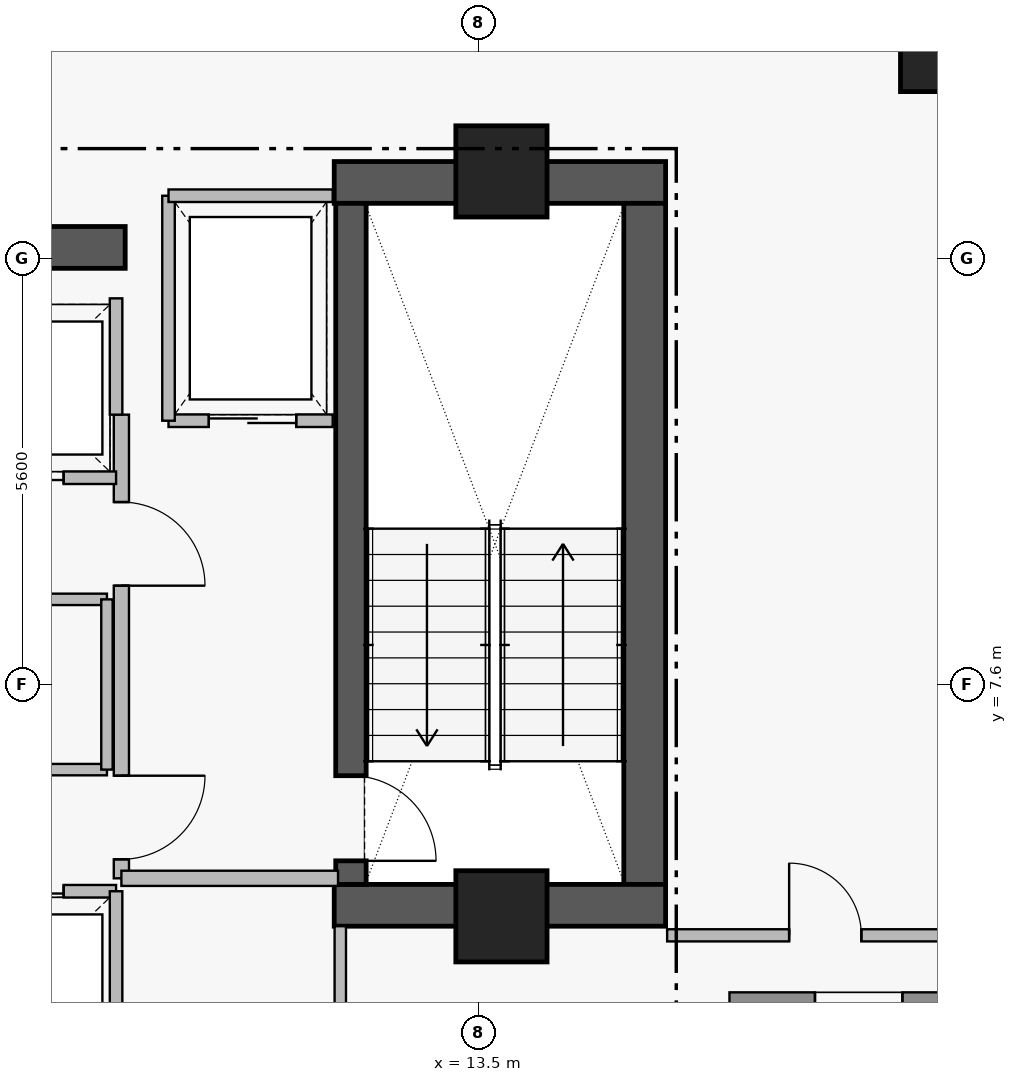
"""IFC4 building model, lengths in metres.
Left out: names, types, materials, properties, quantities, classifications, styles, units other than length and angle.
Written with IfcOpenShell. Run it as: python <this file> out.ifc"""

import sys

from ifc_helpers import new_model, si_unit, direction, frame, frame_2d, origin, origin_2d, place, context, subcontext, project, spatial, rectangle, extrude, element, fill, save


model = new_model("IFC4")
c1 = context("Model", 3, precision=1e-05, world=origin(), true_north=direction((0.0, 1.0)))
c2 = subcontext(c1, "Body", "Model", "MODEL_VIEW")
j1 = project(units=[si_unit("LENGTHUNIT", "METRE"), si_unit("PLANEANGLEUNIT", "RADIAN")], contexts=[c1])
p1 = place(None, origin())
s1 = spatial("IfcSite", under=j1, at=p1, CompositionType="ELEMENT")
p2 = place(p1, origin())
s2 = spatial("IfcBuilding", under=s1, at=p2, CompositionType="ELEMENT")
p3 = place(p2, frame((0.0, 0.0, 261.85)))
s3 = spatial("IfcBuildingStorey", under=s2, at=p3, CompositionType="ELEMENT", Elevation=261.85)
p4 = place(p3, frame((11.6, 14.205, 0.0), z_axis=(0.0, 0.0, 1.0), x_axis=(1.0, 0.0, 0.0)))
e1 = element("IfcWall", 1, at=p4, inside=s3, PredefinedType="SHEAR", context=c2, shape_type="SweptSolid", body=[
    extrude(rectangle(XDim=4.36, YDim=0.55, at=frame_2d((2.18, 0.0))), origin(), (0.0, 0.0, 1.0), 3.51),
])
p5 = place(p3, frame((15.685, 4.97, 0.0), z_axis=(0.0, 0.0, 1.0), x_axis=(0.0, 1.0, 0.0)))
e2 = element("IfcWall", 2, at=p5, inside=s3, PredefinedType="SHEAR", context=c2, shape_type="SweptSolid", body=[
    extrude(rectangle(XDim=8.96, YDim=0.55, at=frame_2d((4.48, 0.0))), origin(), (0.0, 0.0, 1.0), 3.51),
])
p6 = place(p3, frame((11.6, 4.695, 0.0), z_axis=(0.0, 0.0, 1.0), x_axis=(1.0, 0.0, 0.0)))
e3 = element("IfcWall", 3, at=p6, inside=s3, PredefinedType="SHEAR", context=c2, shape_type="SweptSolid", body=[
    extrude(rectangle(XDim=4.36, YDim=0.55, at=frame_2d((2.18, 0.0))), origin(), (0.0, 0.0, 1.0), 3.51),
])
p7 = place(p3, frame((1.25, 13.35, 0.0), z_axis=(0.0, 0.0, 1.0), x_axis=(1.0, 0.0, 0.0)))
e4 = element("IfcWall", 4, at=p7, inside=s3, PredefinedType="SHEAR", context=c2, shape_type="SweptSolid", body=[
    extrude(rectangle(XDim=7.6, YDim=0.55, at=frame_2d((3.8, 0.0))), origin(), (0.0, 0.0, 1.0), 3.48),
])
p8 = place(p3, frame((11.82, 13.93, 0.0), z_axis=(0.0, 0.0, 1.0), x_axis=(0.0, -1.0, 0.0)))
e5 = element("IfcWall", 5, at=p8, inside=s3, PredefinedType="SHEAR", context=c2, shape_type="SweptSolid", body=[
    extrude(rectangle(XDim=8.96, YDim=0.4, at=frame_2d((4.48, 0.0))), origin(), (0.0, 0.0, 1.0), 3.51),
])
p9 = place(p8, frame((7.53, 0.0, 0.0)))
e6 = element("IfcOpeningElement", 6, at=p9, cuts=e5, PredefinedType="OPENING", context=c2, shape_type="SweptSolid", body=[
    extrude(rectangle(XDim=1.12, YDim=2.22, at=frame_2d((0.56, 1.11))), frame((0.0, 0.21, 0.0), z_axis=(0.0, -1.0, 0.0), x_axis=(1.0, 0.0, 0.0)), (0.0, 0.0, 1.0), 0.42),
])
for number, where, z_axis, x_axis in (
    (7, (13.8, 14.35, 0.0), (0.0, 0.0, 1.0), (1.0, 0.0, 0.0)),
    (8, (13.8, 4.55, 0.0), (0.0, 0.0, 1.0), (1.0, 0.0, 0.0)),
):
    element("IfcColumn", number, at=place(p3, frame(where, z_axis=z_axis, x_axis=x_axis)), inside=s3, PredefinedType="COLUMN", context=c2, shape_type="SweptSolid", body=[
        extrude(rectangle(XDim=1.2, YDim=1.2, at=origin_2d()), origin(), (0.0, 0.0, 1.0), 3.7),
    ])
p10 = place(p3, frame((19.55, 15.9, 0.0), z_axis=(0.0, 0.0, 1.0), x_axis=(1.0, 0.0, 0.0)))
e9 = element("IfcColumn", 9, at=p10, inside=s3, PredefinedType="COLUMN", context=c2, shape_type="SweptSolid", body=[
    extrude(rectangle(XDim=1.0, YDim=1.0, at=origin_2d()), origin(), (0.0, 0.0, 1.0), 3.7),
])
p11 = place(p3, frame((20.2, 3.4, 0.0), z_axis=(0.0, 0.0, 1.0), x_axis=(-1.0, 0.0, 0.0)))
e10 = element("IfcWall", 10, at=p11, inside=s3, PredefinedType="STANDARD", context=c2, shape_type="SweptSolid", body=[
    extrude(rectangle(XDim=3.4, YDim=0.3, at=frame_2d((1.7, 0.0))), origin(), (0.0, 0.0, 1.0), 3.48),
])
p12 = place(p11, frame((1.125, 0.0, 1.25)))
e11 = element("IfcOpeningElement", 11, at=p12, cuts=e10, PredefinedType="OPENING", context=c2, shape_type="SweptSolid", body=[
    extrude(rectangle(XDim=1.15, YDim=1.55, at=frame_2d((0.575, 0.775))), frame((0.0, 0.16, 0.0), z_axis=(0.0, -1.0, 0.0), x_axis=(1.0, 0.0, 0.0)), (0.0, 0.0, 1.0), 0.32),
])
p13 = place(p3, frame((8.8, 11.15, 0.0), z_axis=(0.0, 0.0, 1.0), x_axis=(0.0, -1.0, 0.0)))
e12 = element("IfcWall", 12, at=p13, inside=s3, PredefinedType="PARTITIONING", context=c2, shape_type="SweptSolid", body=[
    extrude(rectangle(XDim=6.1, YDim=0.2, at=frame_2d((3.05, 0.0))), origin(), (0.0, 0.0, 1.0), 3.48),
])
p14 = place(p13, frame((1.15, 0.0, 0.0)))
e13 = element("IfcOpeningElement", 13, at=p14, cuts=e12, PredefinedType="OPENING", context=c2, shape_type="SweptSolid", body=[
    extrude(rectangle(XDim=1.1, YDim=2.2, at=frame_2d((0.55, 1.1))), frame((0.0, 0.11, 0.0), z_axis=(0.0, -1.0, 0.0), x_axis=(1.0, 0.0, 0.0)), (0.0, 0.0, 1.0), 0.22),
])
p15 = place(p13, frame((4.75, 0.0, 0.0)))
e14 = element("IfcOpeningElement", 14, at=p15, cuts=e12, PredefinedType="OPENING", context=c2, shape_type="SweptSolid", body=[
    extrude(rectangle(XDim=1.1, YDim=2.2, at=frame_2d((0.55, 1.1))), frame((0.0, 0.11, 0.0), z_axis=(0.0, -1.0, 0.0), x_axis=(1.0, 0.0, 0.0)), (0.0, 0.0, 1.0), 0.22),
])
p16 = place(p3, frame((9.42, 11.07, 0.0), z_axis=(0.0, 0.0, 1.0), x_axis=(1.0, 0.0, 0.0)))
e15 = element("IfcWall", 15, at=p16, inside=s3, PredefinedType="PARTITIONING", context=c2, shape_type="SweptSolid", body=[
    extrude(rectangle(XDim=2.16, YDim=0.165, at=frame_2d((1.08, 0.0))), origin(), (0.0, 0.0, 1.0), 3.48),
])
p17 = place(p16, frame((0.53, 0.0, 0.0)))
e16 = element("IfcOpeningElement", 16, at=p17, cuts=e15, PredefinedType="OPENING", context=c2, shape_type="SweptSolid", body=[
    extrude(rectangle(XDim=1.15, YDim=2.25, at=frame_2d((0.575, 1.125))), frame((0.0, 0.093, 0.0), z_axis=(0.0, -1.0, 0.0), x_axis=(1.0, 0.0, 0.0)), (0.0, 0.0, 1.0), 0.185),
])
p18 = place(p3, frame((6.25, 4.88, 0.0), z_axis=(0.0, 0.0, 1.0), x_axis=(1.0, 0.0, 0.0)))
e17 = element("IfcWall", 17, at=p18, inside=s3, PredefinedType="PARTITIONING", context=c2, shape_type="SweptSolid", body=[
    extrude(rectangle(XDim=2.48, YDim=0.165, at=frame_2d((1.24, 0.0))), origin(), (0.0, 0.0, 1.0), 3.48),
])
p19 = place(p18, frame((0.69, 0.0, 0.0)))
e18 = element("IfcOpeningElement", 18, at=p19, cuts=e17, PredefinedType="OPENING", context=c2, shape_type="SweptSolid", body=[
    extrude(rectangle(XDim=1.1, YDim=2.25, at=frame_2d((0.55, 1.125))), frame((0.0, 0.093, 0.0), z_axis=(0.0, -1.0, 0.0), x_axis=(1.0, 0.0, 0.0)), (0.0, 0.0, 1.0), 0.185),
])
p20 = place(p3, frame((6.25, 10.32, 0.0), z_axis=(0.0, 0.0, 1.0), x_axis=(1.0, 0.0, 0.0)))
e19 = element("IfcWall", 19, at=p20, inside=s3, PredefinedType="PARTITIONING", context=c2, shape_type="SweptSolid", body=[
    extrude(rectangle(XDim=2.48, YDim=0.165, at=frame_2d((1.24, 0.0))), origin(), (0.0, 0.0, 1.0), 3.48),
])
p21 = place(p20, frame((0.69, 0.0, 0.0)))
e20 = element("IfcOpeningElement", 20, at=p21, cuts=e19, PredefinedType="OPENING", context=c2, shape_type="SweptSolid", body=[
    extrude(rectangle(XDim=1.1, YDim=2.25, at=frame_2d((0.55, 1.125))), frame((0.0, 0.093, 0.0), z_axis=(0.0, -1.0, 0.0), x_axis=(1.0, 0.0, 0.0)), (0.0, 0.0, 1.0), 0.185),
])
p22 = place(p3, frame((4.37, 6.48, 0.0), z_axis=(0.0, 0.0, 1.0), x_axis=(1.0, 0.0, 0.0)))
e21 = element("IfcWall", 21, at=p22, inside=s3, PredefinedType="PARTITIONING", context=c2, shape_type="SweptSolid", body=[
    extrude(rectangle(XDim=4.24, YDim=0.15, at=frame_2d((2.12, 0.0))), origin(), (0.0, 0.0, 1.0), 3.48),
])
p23 = place(p22, frame((1.67, 0.0, 0.0)))
e22 = element("IfcOpeningElement", 22, at=p23, cuts=e21, PredefinedType="OPENING", context=c2, shape_type="SweptSolid", body=[
    extrude(rectangle(XDim=0.9, YDim=2.15, at=frame_2d((0.45, 1.075))), frame((0.0, 0.085, 0.0), z_axis=(0.0, -1.0, 0.0), x_axis=(1.0, 0.0, 0.0)), (0.0, 0.0, 1.0), 0.17),
])
p24 = place(p3, frame((15.98, 4.3, 0.0), z_axis=(0.0, 0.0, 1.0), x_axis=(1.0, 0.0, 0.0)))
e23 = element("IfcWall", 23, at=p24, inside=s3, PredefinedType="PARTITIONING", context=c2, shape_type="SweptSolid", body=[
    extrude(rectangle(XDim=4.16, YDim=0.16, at=frame_2d((2.08, 0.0))), origin(), (0.0, 0.0, 1.0), 3.48),
])
p25 = place(p24, frame((1.605, 0.0, 0.0)))
e24 = element("IfcOpeningElement", 24, at=p25, cuts=e23, PredefinedType="OPENING", context=c2, shape_type="SweptSolid", body=[
    extrude(rectangle(XDim=0.95, YDim=2.15, at=frame_2d((0.475, 1.075))), frame((0.0, 0.09, 0.0), z_axis=(0.0, -1.0, 0.0), x_axis=(1.0, 0.0, 0.0)), (0.0, 0.0, 1.0), 0.18),
])
p26 = place(p3, frame((8.8, 5.05, 0.0), z_axis=(0.0, 0.0, 1.0), x_axis=(1.0, 0.0, 0.0)))
e25 = element("IfcWall", 25, at=p26, inside=s3, PredefinedType="PARTITIONING", context=c2, shape_type="SweptSolid", body=[
    extrude(rectangle(XDim=2.85, YDim=0.2, at=frame_2d((1.425, 0.0))), origin(), (0.0, 0.0, 1.0), 3.48),
])
p27 = place(p3, frame((9.42, 11.07, 0.0), z_axis=(0.0, 0.0, 1.0), x_axis=(0.0, 1.0, 0.0)))
e26 = element("IfcWall", 26, at=p27, inside=s3, PredefinedType="PARTITIONING", context=c2, shape_type="SweptSolid", body=[
    extrude(rectangle(XDim=2.96, YDim=0.165, at=frame_2d((1.48, 0.0))), origin(), (0.0, 0.0, 1.0), 3.48),
])
p28 = place(p3, frame((9.42, 14.03, 0.0), z_axis=(0.0, 0.0, 1.0), x_axis=(1.0, 0.0, 0.0)))
e27 = element("IfcWall", 27, at=p28, inside=s3, PredefinedType="PARTITIONING", context=c2, shape_type="SweptSolid", body=[
    extrude(rectangle(XDim=2.16, YDim=0.165, at=frame_2d((1.08, 0.0))), origin(), (0.0, 0.0, 1.0), 3.48),
])
p29 = place(p3, frame((8.73, 2.52, 0.0), z_axis=(0.0, 0.0, 1.0), x_axis=(0.0, 1.0, 0.0)))
e28 = element("IfcWall", 28, at=p29, inside=s3, PredefinedType="PARTITIONING", context=c2, shape_type="SweptSolid", body=[
    extrude(rectangle(XDim=2.36, YDim=0.165, at=frame_2d((1.18, 0.0))), origin(), (0.0, 0.0, 1.0), 3.48),
])
p30 = place(p3, frame((8.73, 11.15, 0.0), z_axis=(0.0, 0.0, 1.0), x_axis=(0.0, 1.0, 0.0)))
e29 = element("IfcWall", 29, at=p30, inside=s3, PredefinedType="PARTITIONING", context=c2, shape_type="SweptSolid", body=[
    extrude(rectangle(XDim=1.53, YDim=0.165, at=frame_2d((0.765, 0.0))), origin(), (0.0, 0.0, 1.0), 3.48),
])
p31 = place(p3, frame((4.37, 8.72, 0.0), z_axis=(0.0, 0.0, 1.0), x_axis=(1.0, 0.0, 0.0)))
e30 = element("IfcWall", 30, at=p31, inside=s3, PredefinedType="PARTITIONING", context=c2, shape_type="SweptSolid", body=[
    extrude(rectangle(XDim=4.24, YDim=0.15, at=frame_2d((2.12, 0.0))), origin(), (0.0, 0.0, 1.0), 3.48),
])
p32 = place(p3, frame((8.61, 6.48, 0.0), z_axis=(0.0, 0.0, 1.0), x_axis=(0.0, 1.0, 0.0)))
e31 = element("IfcWall", 31, at=p32, inside=s3, PredefinedType="PARTITIONING", context=c2, shape_type="SweptSolid", body=[
    extrude(rectangle(XDim=2.24, YDim=0.15, at=frame_2d((1.12, 0.0))), origin(), (0.0, 0.0, 1.0), 3.48),
])
p33 = place(p3, frame((11.68, 1.72, 0.0), z_axis=(0.0, 0.0, 1.0), x_axis=(0.0, 1.0, 0.0)))
e32 = element("IfcWall", 32, at=p33, inside=s3, PredefinedType="PARTITIONING", context=c2, shape_type="SweptSolid", body=[
    extrude(rectangle(XDim=2.7, YDim=0.15, at=frame_2d((1.35, 0.0))), origin(), (0.0, 0.0, 1.0), 3.48),
])
p34 = place(p12, origin())
e33 = element("IfcWindow", 33, at=p34, inside=s3, PartitioningType="SINGLE_PANEL", PredefinedType="WINDOW", context=c2, shape_type="SweptSolid", body=[
    extrude(rectangle(XDim=1.15, YDim=1.55, at=frame_2d((0.575, 0.775))), frame((0.0, 0.03, 0.0), z_axis=(0.0, -1.0, 0.0), x_axis=(1.0, 0.0, 0.0)), (0.0, 0.0, 1.0), 0.06),
])
fill(e11, e33)
p35 = place(p9, origin())
e34 = element("IfcDoor", 34, at=p35, inside=s3, OperationType="SINGLE_SWING_RIGHT", PredefinedType="DOOR", context=c2, shape_type="SweptSolid", body=[
    extrude(rectangle(XDim=1.12, YDim=2.22, at=frame_2d((0.56, 1.11))), frame((0.0, 0.025, 0.0), z_axis=(0.0, -1.0, 0.0), x_axis=(1.0, 0.0, 0.0)), (0.0, 0.0, 1.0), 0.05),
])
fill(e6, e34)
p36 = place(p14, origin())
e35 = element("IfcDoor", 35, at=p36, inside=s3, OperationType="SINGLE_SWING_RIGHT", PredefinedType="DOOR", context=c2, shape_type="SweptSolid", body=[
    extrude(rectangle(XDim=1.1, YDim=2.2, at=frame_2d((0.55, 1.1))), frame((0.0, 0.025, 0.0), z_axis=(0.0, -1.0, 0.0), x_axis=(1.0, 0.0, 0.0)), (0.0, 0.0, 1.0), 0.05),
])
fill(e13, e35)
p37 = place(p15, origin())
e36 = element("IfcDoor", 36, at=p37, inside=s3, OperationType="SINGLE_SWING_LEFT", PredefinedType="DOOR", context=c2, shape_type="SweptSolid", body=[
    extrude(rectangle(XDim=1.1, YDim=2.2, at=frame_2d((0.55, 1.1))), frame((0.0, 0.025, 0.0), z_axis=(0.0, -1.0, 0.0), x_axis=(1.0, 0.0, 0.0)), (0.0, 0.0, 1.0), 0.05),
])
fill(e14, e36)
p38 = place(p17, origin())
e37 = element("IfcDoor", 37, at=p38, inside=s3, OperationType="SLIDING_TO_LEFT", PredefinedType="DOOR", context=c2, shape_type="SweptSolid", body=[
    extrude(rectangle(XDim=1.15, YDim=2.25, at=frame_2d((0.575, 1.125))), frame((0.0, 0.025, 0.0), z_axis=(0.0, -1.0, 0.0), x_axis=(1.0, 0.0, 0.0)), (0.0, 0.0, 1.0), 0.05),
])
fill(e16, e37)
p39 = place(p19, origin())
e38 = element("IfcDoor", 38, at=p39, inside=s3, OperationType="SLIDING_TO_LEFT", PredefinedType="DOOR", context=c2, shape_type="SweptSolid", body=[
    extrude(rectangle(XDim=1.1, YDim=2.25, at=frame_2d((0.55, 1.125))), frame((0.0, 0.025, 0.0), z_axis=(0.0, -1.0, 0.0), x_axis=(1.0, 0.0, 0.0)), (0.0, 0.0, 1.0), 0.05),
])
fill(e18, e38)
p40 = place(p21, origin())
e39 = element("IfcDoor", 39, at=p40, inside=s3, OperationType="SLIDING_TO_LEFT", PredefinedType="DOOR", context=c2, shape_type="SweptSolid", body=[
    extrude(rectangle(XDim=1.1, YDim=2.25, at=frame_2d((0.55, 1.125))), frame((0.0, 0.025, 0.0), z_axis=(0.0, -1.0, 0.0), x_axis=(1.0, 0.0, 0.0)), (0.0, 0.0, 1.0), 0.05),
])
fill(e20, e39)
p41 = place(p25, origin())
e40 = element("IfcDoor", 40, at=p41, inside=s3, OperationType="SINGLE_SWING_LEFT", PredefinedType="DOOR", context=c2, shape_type="SweptSolid", body=[
    extrude(rectangle(XDim=0.95, YDim=2.15, at=frame_2d((0.475, 1.075))), frame((0.0, 0.025, 0.0), z_axis=(0.0, -1.0, 0.0), x_axis=(1.0, 0.0, 0.0)), (0.0, 0.0, 1.0), 0.05),
])
fill(e24, e40)
save(model, sys.argv[1])
